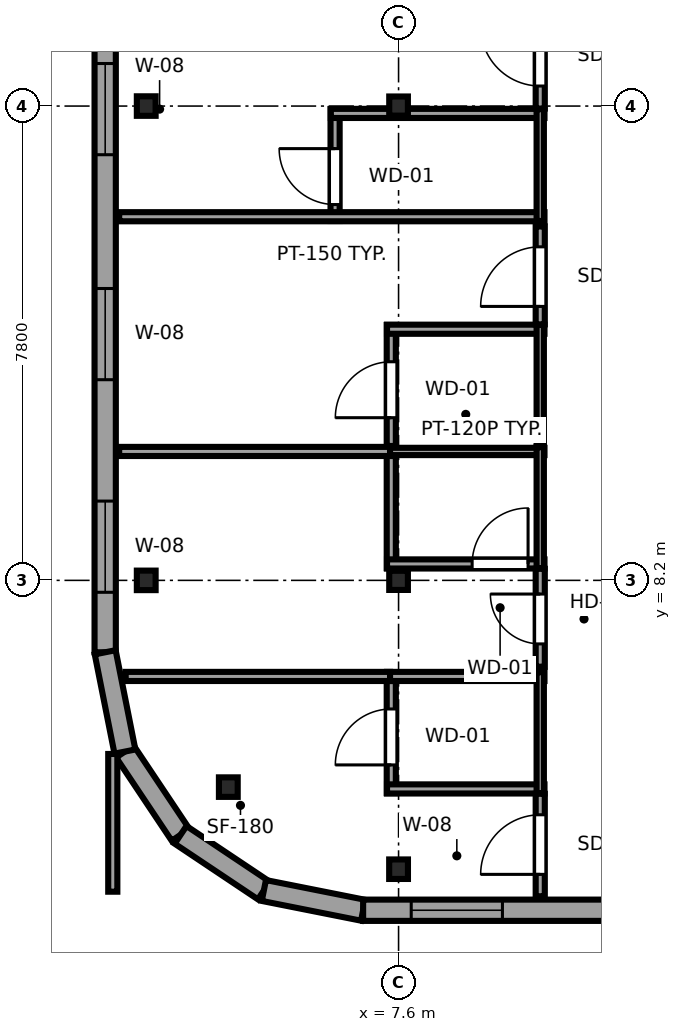
"""IFC4 building model, lengths in metres.
Left out: names, types, materials, properties, quantities, classifications, styles, units other than length and angle.
Written with IfcOpenShell. Run it as: python <this file> out.ifc"""

import sys

from ifc_helpers import new_model, si_unit, direction, frame, frame_2d, origin, origin_2d, place, context, subcontext, project, spatial, rectangle, i_section, extrude, source, transform, mapped, element, fill, save


model = new_model("IFC4")
c1 = context("Model", 3, precision=1e-05, world=origin(), true_north=direction((0.0, 1.0)))
c2 = subcontext(c1, "Body", "Model", "MODEL_VIEW")
j1 = project(units=[si_unit("LENGTHUNIT", "METRE"), si_unit("PLANEANGLEUNIT", "RADIAN")], contexts=[c1])
p1 = place(None, origin())
s1 = spatial("IfcSite", under=j1, at=p1, CompositionType="ELEMENT")
p2 = place(p1, origin())
s2 = spatial("IfcBuilding", under=s1, at=p2, CompositionType="ELEMENT")
p3 = place(p2, frame((0.0, 0.0, 266.5)))
s3 = spatial("IfcBuildingStorey", under=s2, at=p3, CompositionType="ELEMENT", Elevation=266.5)
m1 = source(origin(), c2, "Body", "SweptSolid", [
    extrude(i_section(OverallWidth=0.309, OverallDepth=0.321, WebThickness=0.014, FlangeThickness=0.022, FilletRadius=0.017, at=origin_2d()), origin(), (0.0, 0.0, 1.0), 3.55),
])
for number, where, z_axis, x_axis in (
    (1, (4.8, 4.8, 0.0), (0.0, 0.0, 1.0), (1.0, 0.0, 0.0)),
    (2, (3.45, 8.2, 0.0), (0.0, 0.0, 1.0), (1.0, 0.0, 0.0)),
    (3, (3.45, 16.0, 0.0), (0.0, 0.0, 1.0), (1.0, 0.0, 0.0)),
    (4, (7.6, 3.45, 0.0), (0.0, 0.0, 1.0), (1.0, 0.0, 0.0)),
):
    element("IfcColumn", number, at=place(p3, frame(where, z_axis=z_axis, x_axis=x_axis)), inside=s3, PredefinedType="COLUMN", context=c2, shape_type="MappedRepresentation", body=[
        mapped(m1, transform((0.0, 0.0, 0.0), x_axis=(1.0, 0.0, 0.0), y_axis=(0.0, 1.0, 0.0), z_axis=(0.0, 0.0, 1.0), scale=1.0)),
    ])
m2 = source(origin(), c2, "Body", "SweptSolid", [
    extrude(i_section(OverallWidth=0.307, OverallDepth=0.315, WebThickness=0.012, FlangeThickness=0.019, FilletRadius=0.017, at=origin_2d()), origin(), (0.0, 0.0, 1.0), 3.55),
])
for number, where, z_axis, x_axis in (
    (5, (7.6, 8.2, 0.0), (0.0, 0.0, 1.0), (1.0, 0.0, 0.0)),
    (6, (7.6, 16.0, 0.0), (0.0, 0.0, 1.0), (1.0, 0.0, 0.0)),
):
    element("IfcColumn", number, at=place(p3, frame(where, z_axis=z_axis, x_axis=x_axis)), inside=s3, PredefinedType="COLUMN", context=c2, shape_type="MappedRepresentation", body=[
        mapped(m2, transform((0.0, 0.0, 0.0), x_axis=(1.0, 0.0, 0.0), y_axis=(0.0, 1.0, 0.0), z_axis=(0.0, 0.0, 1.0), scale=1.0)),
    ])
p4 = place(p3, frame((3.1, 5.385, 0.0), z_axis=(0.0, 0.0, 1.0), x_axis=(0.555623290322, -0.831434158098, 0.0)))
e7 = element("IfcWall", 7, at=p4, inside=s3, PredefinedType="SOLIDWALL", context=c2, shape_type="SweptSolid", body=[
    extrude(rectangle(XDim=1.647, YDim=0.35, at=frame_2d((0.824, 0.0))), origin(), (0.0, 0.0, 1.0), 2.04),
])
p5 = place(p3, frame((4.015, 4.015, 0.0), z_axis=(0.0, 0.0, 1.0), x_axis=(0.831434158098, -0.555623290322, 0.0)))
e8 = element("IfcWall", 8, at=p5, inside=s3, PredefinedType="SOLIDWALL", context=c2, shape_type="SweptSolid", body=[
    extrude(rectangle(XDim=1.647, YDim=0.35, at=frame_2d((0.824, 0.0))), origin(), (0.0, 0.0, 1.0), 3.25),
])
p6 = place(p3, frame((5.385, 3.1, 0.0), z_axis=(0.0, 0.0, 1.0), x_axis=(0.980788844421, -0.195072403631, 0.0)))
e9 = element("IfcWall", 9, at=p6, inside=s3, PredefinedType="SOLIDWALL", context=c2, shape_type="SweptSolid", body=[
    extrude(rectangle(XDim=1.665, YDim=0.35, at=frame_2d((0.832, 0.0))), origin(), (0.0, 0.0, 1.0), 3.25),
])
p7 = place(p3, frame((7.017, 2.775, 0.0), z_axis=(0.0, 0.0, 1.0), x_axis=(1.0, 0.0, 0.0)))
e10 = element("IfcWall", 10, at=p7, inside=s3, PredefinedType="SOLIDWALL", context=c2, shape_type="SweptSolid", body=[
    extrude(rectangle(XDim=8.008, YDim=0.35, at=frame_2d((4.004, 0.0))), origin(), (0.0, 0.0, 1.0), 3.25),
])
p8 = place(p7, frame((0.791, 0.0, 0.62)))
e11 = element("IfcOpeningElement", 11, at=p8, cuts=e10, PredefinedType="OPENING", context=c2, shape_type="SweptSolid", body=[
    extrude(rectangle(XDim=1.5, YDim=1.55, at=frame_2d((0.75, 0.775))), frame((0.0, 0.185, 0.0), z_axis=(0.0, -1.0, 0.0), x_axis=(1.0, 0.0, 0.0)), (0.0, 0.0, 1.0), 0.37),
])
p9 = place(p3, frame((2.775, 40.783, 0.0), z_axis=(0.0, 0.0, 1.0), x_axis=(0.0, -1.0, 0.0)))
e12 = element("IfcWall", 12, at=p9, inside=s3, PredefinedType="SOLIDWALL", context=c2, shape_type="SweptSolid", body=[
    extrude(rectangle(XDim=33.766, YDim=0.35, at=frame_2d((16.883, 0.0))), origin(), (0.0, 0.0, 1.0), 3.25),
])
p10 = place(p9, frame((5.678, 0.0, 0.68)))
e13 = element("IfcOpeningElement", 13, at=p10, cuts=e12, PredefinedType="OPENING", context=c2, shape_type="SweptSolid", body=[
    extrude(rectangle(XDim=2.7, YDim=1.95, at=frame_2d((1.35, 0.975))), frame((0.0, 0.185, 0.0), z_axis=(0.0, -1.0, 0.0), x_axis=(1.0, 0.0, 0.0)), (0.0, 0.0, 1.0), 0.37),
])
p11 = place(p9, frame((11.431, 0.0, 0.68)))
e14 = element("IfcOpeningElement", 14, at=p11, cuts=e12, PredefinedType="OPENING", context=c2, shape_type="SweptSolid", body=[
    extrude(rectangle(XDim=2.7, YDim=1.95, at=frame_2d((1.35, 0.975))), frame((0.0, 0.185, 0.0), z_axis=(0.0, -1.0, 0.0), x_axis=(1.0, 0.0, 0.0)), (0.0, 0.0, 1.0), 0.37),
])
p12 = place(p9, frame((15.533, 0.0, 0.68)))
e15 = element("IfcOpeningElement", 15, at=p12, cuts=e12, PredefinedType="OPENING", context=c2, shape_type="SweptSolid", body=[
    extrude(rectangle(XDim=2.7, YDim=1.95, at=frame_2d((1.35, 0.975))), frame((0.0, 0.185, 0.0), z_axis=(0.0, -1.0, 0.0), x_axis=(1.0, 0.0, 0.0)), (0.0, 0.0, 1.0), 0.37),
])
p13 = place(p9, frame((19.635, 0.0, 0.68)))
e16 = element("IfcOpeningElement", 16, at=p13, cuts=e12, PredefinedType="OPENING", context=c2, shape_type="SweptSolid", body=[
    extrude(rectangle(XDim=2.7, YDim=1.95, at=frame_2d((1.35, 0.975))), frame((0.0, 0.185, 0.0), z_axis=(0.0, -1.0, 0.0), x_axis=(1.0, 0.0, 0.0)), (0.0, 0.0, 1.0), 0.37),
])
p14 = place(p9, frame((31.279, 0.0, 0.62)))
e17 = element("IfcOpeningElement", 17, at=p14, cuts=e12, PredefinedType="OPENING", context=c2, shape_type="SweptSolid", body=[
    extrude(rectangle(XDim=1.5, YDim=1.55, at=frame_2d((0.75, 0.775))), frame((0.0, 0.185, 0.0), z_axis=(0.0, -1.0, 0.0), x_axis=(1.0, 0.0, 0.0)), (0.0, 0.0, 1.0), 0.37),
])
p15 = place(p9, frame((27.783, 0.0, 0.62)))
e18 = element("IfcOpeningElement", 18, at=p15, cuts=e12, PredefinedType="OPENING", context=c2, shape_type="SweptSolid", body=[
    extrude(rectangle(XDim=1.5, YDim=1.55, at=frame_2d((0.75, 0.775))), frame((0.0, 0.185, 0.0), z_axis=(0.0, -1.0, 0.0), x_axis=(1.0, 0.0, 0.0)), (0.0, 0.0, 1.0), 0.37),
])
p16 = place(p9, frame((24.083, 0.0, 0.62)))
e19 = element("IfcOpeningElement", 19, at=p16, cuts=e12, PredefinedType="OPENING", context=c2, shape_type="SweptSolid", body=[
    extrude(rectangle(XDim=1.5, YDim=1.55, at=frame_2d((0.75, 0.775))), frame((0.0, 0.185, 0.0), z_axis=(0.0, -1.0, 0.0), x_axis=(1.0, 0.0, 0.0)), (0.0, 0.0, 1.0), 0.37),
])
p17 = place(p9, frame((0.586, 0.0, 0.62)))
e20 = element("IfcOpeningElement", 20, at=p17, cuts=e12, PredefinedType="OPENING", context=c2, shape_type="SweptSolid", body=[
    extrude(rectangle(XDim=1.5, YDim=1.55, at=frame_2d((0.75, 0.775))), frame((0.0, 0.185, 0.0), z_axis=(0.0, -1.0, 0.0), x_axis=(1.0, 0.0, 0.0)), (0.0, 0.0, 1.0), 0.37),
])
p18 = place(p3, frame((2.775, 7.017, 0.0), z_axis=(0.0, 0.0, 1.0), x_axis=(0.195072403631, -0.980788844421, 0.0)))
e21 = element("IfcWall", 21, at=p18, inside=s3, PredefinedType="SOLIDWALL", context=c2, shape_type="SweptSolid", body=[
    extrude(rectangle(XDim=1.665, YDim=0.35, at=frame_2d((0.832, 0.0))), origin(), (0.0, 0.0, 1.0), 2.04),
])
p19 = place(p3, frame((7.48, 4.7, 0.0), z_axis=(0.0, 0.0, 1.0), x_axis=(0.0, 1.0, 0.0)))
e22 = element("IfcWall", 22, at=p19, inside=s3, PredefinedType="PARTITIONING", context=c2, shape_type="SweptSolid", body=[
    extrude(rectangle(XDim=1.99, YDim=0.15, at=frame_2d((0.995, 0.0))), origin(), (0.0, 0.0, 1.0), 2.04),
])
p20 = place(p19, frame((0.465, 0.0, 0.0)))
e23 = element("IfcOpeningElement", 23, at=p20, cuts=e22, PredefinedType="OPENING", context=c2, shape_type="SweptSolid", body=[
    extrude(rectangle(XDim=0.92, YDim=2.01, at=frame_2d((0.46, 1.005))), frame((0.0, 0.085, 0.0), z_axis=(0.0, -1.0, 0.0), x_axis=(1.0, 0.0, 0.0)), (0.0, 0.0, 1.0), 0.17),
])
for number, where, z_axis, x_axis in (
    (24, (7.41, 4.77, 0.0), (0.0, 0.0, 1.0), (1.0, 0.0, 0.0)),
    (25, (7.41, 6.62, 0.0), (0.0, 0.0, 1.0), (1.0, 0.0, 0.0)),
):
    element("IfcWall", number, at=place(p3, frame(where, z_axis=z_axis, x_axis=x_axis)), inside=s3, PredefinedType="PARTITIONING", context=c2, shape_type="SweptSolid", body=[
        extrude(rectangle(XDim=2.59, YDim=0.15, at=frame_2d((1.295, 0.0))), origin(), (0.0, 0.0, 1.0), 3.25),
    ])
p21 = place(p3, frame((9.93, 4.7, 0.0), z_axis=(0.0, 0.0, 1.0), x_axis=(0.0, 1.0, 0.0)))
e26 = element("IfcWall", 26, at=p21, inside=s3, PredefinedType="PLUMBINGWALL", context=c2, shape_type="SweptSolid", body=[
    extrude(rectangle(XDim=1.99, YDim=0.12, at=frame_2d((0.995, 0.0))), origin(), (0.0, 0.0, 1.0), 3.25),
])
p22 = place(p3, frame((7.48, 8.4, 0.0), z_axis=(0.0, 0.0, 1.0), x_axis=(0.0, 1.0, 0.0)))
e27 = element("IfcWall", 27, at=p22, inside=s3, PredefinedType="PARTITIONING", context=c2, shape_type="SweptSolid", body=[
    extrude(rectangle(XDim=1.99, YDim=0.15, at=frame_2d((0.995, 0.0))), origin(), (0.0, 0.0, 1.0), 2.04),
])
p23 = place(p3, frame((7.41, 8.47, 0.0), z_axis=(0.0, 0.0, 1.0), x_axis=(1.0, 0.0, 0.0)))
e28 = element("IfcWall", 28, at=p23, inside=s3, PredefinedType="PARTITIONING", context=c2, shape_type="SweptSolid", body=[
    extrude(rectangle(XDim=2.59, YDim=0.15, at=frame_2d((1.295, 0.0))), origin(), (0.0, 0.0, 1.0), 2.04),
])
p24 = place(p23, frame((1.4, 0.0, 0.0)))
e29 = element("IfcOpeningElement", 29, at=p24, cuts=e28, PredefinedType="OPENING", context=c2, shape_type="SweptSolid", body=[
    extrude(rectangle(XDim=0.92, YDim=2.01, at=frame_2d((0.46, 1.005))), frame((0.0, 0.085, 0.0), z_axis=(0.0, -1.0, 0.0), x_axis=(1.0, 0.0, 0.0)), (0.0, 0.0, 1.0), 0.17),
])
p25 = place(p3, frame((7.41, 10.32, 0.0), z_axis=(0.0, 0.0, 1.0), x_axis=(1.0, 0.0, 0.0)))
e30 = element("IfcWall", 30, at=p25, inside=s3, PredefinedType="PLUMBINGWALL", context=c2, shape_type="SweptSolid", body=[
    extrude(rectangle(XDim=2.59, YDim=0.12, at=frame_2d((1.295, 0.0))), origin(), (0.0, 0.0, 1.0), 3.25),
])
p26 = place(p3, frame((9.93, 8.4, 0.0), z_axis=(0.0, 0.0, 1.0), x_axis=(0.0, 1.0, 0.0)))
e31 = element("IfcWall", 31, at=p26, inside=s3, PredefinedType="PLUMBINGWALL", context=c2, shape_type="SweptSolid", body=[
    extrude(rectangle(XDim=1.99, YDim=0.12, at=frame_2d((0.995, 0.0))), origin(), (0.0, 0.0, 1.0), 3.25),
])
p27 = place(p3, frame((7.48, 10.41, 0.0), z_axis=(0.0, 0.0, 1.0), x_axis=(0.0, 1.0, 0.0)))
e32 = element("IfcWall", 32, at=p27, inside=s3, PredefinedType="PARTITIONING", context=c2, shape_type="SweptSolid", body=[
    extrude(rectangle(XDim=1.99, YDim=0.15, at=frame_2d((0.995, 0.0))), origin(), (0.0, 0.0, 1.0), 2.04),
])
p28 = place(p27, frame((0.465, 0.0, 0.0)))
e33 = element("IfcOpeningElement", 33, at=p28, cuts=e32, PredefinedType="OPENING", context=c2, shape_type="SweptSolid", body=[
    extrude(rectangle(XDim=0.92, YDim=2.01, at=frame_2d((0.46, 1.005))), frame((0.0, 0.085, 0.0), z_axis=(0.0, -1.0, 0.0), x_axis=(1.0, 0.0, 0.0)), (0.0, 0.0, 1.0), 0.17),
])
p29 = place(p3, frame((7.41, 12.33, 0.0), z_axis=(0.0, 0.0, 1.0), x_axis=(1.0, 0.0, 0.0)))
e34 = element("IfcWall", 34, at=p29, inside=s3, PredefinedType="PARTITIONING", context=c2, shape_type="SweptSolid", body=[
    extrude(rectangle(XDim=2.59, YDim=0.15, at=frame_2d((1.295, 0.0))), origin(), (0.0, 0.0, 1.0), 3.25),
])
p30 = place(p3, frame((9.93, 10.41, 0.0), z_axis=(0.0, 0.0, 1.0), x_axis=(0.0, 1.0, 0.0)))
e35 = element("IfcWall", 35, at=p30, inside=s3, PredefinedType="PLUMBINGWALL", context=c2, shape_type="SweptSolid", body=[
    extrude(rectangle(XDim=1.99, YDim=0.12, at=frame_2d((0.995, 0.0))), origin(), (0.0, 0.0, 1.0), 3.25),
])
p31 = place(p3, frame((6.556, 14.11, 0.0), z_axis=(0.0, 0.0, 1.0), x_axis=(0.0, 1.0, 0.0)))
e36 = element("IfcWall", 36, at=p31, inside=s3, PredefinedType="PARTITIONING", context=c2, shape_type="SweptSolid", body=[
    extrude(rectangle(XDim=1.839, YDim=0.15, at=frame_2d((0.919, 0.0))), origin(), (0.0, 0.0, 1.0), 3.25),
])
p32 = place(p31, frame((0.27, 0.0, 0.0)))
e37 = element("IfcOpeningElement", 37, at=p32, cuts=e36, PredefinedType="OPENING", context=c2, shape_type="SweptSolid", body=[
    extrude(rectangle(XDim=0.92, YDim=2.01, at=frame_2d((0.46, 1.005))), frame((0.0, 0.085, 0.0), z_axis=(0.0, -1.0, 0.0), x_axis=(1.0, 0.0, 0.0)), (0.0, 0.0, 1.0), 0.17),
])
p33 = place(p3, frame((3.005, 14.18, 0.0), z_axis=(0.0, 0.0, 1.0), x_axis=(1.0, 0.0, 0.0)))
e38 = element("IfcWall", 38, at=p33, inside=s3, PredefinedType="PARTITIONING", context=c2, shape_type="SweptSolid", body=[
    extrude(rectangle(XDim=6.995, YDim=0.15, at=frame_2d((3.498, 0.0))), origin(), (0.0, 0.0, 1.0), 3.25),
])
p34 = place(p3, frame((6.486, 15.879, 0.0), z_axis=(0.0, 0.0, 1.0), x_axis=(1.0, 0.0, 0.0)))
e39 = element("IfcWall", 39, at=p34, inside=s3, PredefinedType="PARTITIONING", context=c2, shape_type="SweptSolid", body=[
    extrude(rectangle(XDim=3.514, YDim=0.15, at=frame_2d((1.757, 0.0))), origin(), (0.0, 0.0, 1.0), 2.04),
])
p35 = place(p3, frame((9.93, 14.11, 0.0), z_axis=(0.0, 0.0, 1.0), x_axis=(0.0, 1.0, 0.0)))
e40 = element("IfcWall", 40, at=p35, inside=s3, PredefinedType="PLUMBINGWALL", context=c2, shape_type="SweptSolid", body=[
    extrude(rectangle(XDim=1.839, YDim=0.12, at=frame_2d((0.919, 0.0))), origin(), (0.0, 0.0, 1.0), 3.25),
])
p36 = place(p3, frame((9.93, 3.005, 0.0), z_axis=(0.0, 0.0, 1.0), x_axis=(0.0, 1.0, 0.0)))
e41 = element("IfcWall", 41, at=p36, inside=s3, PredefinedType="PARTITIONING", context=c2, shape_type="SweptSolid", body=[
    extrude(rectangle(XDim=1.685, YDim=0.15, at=frame_2d((0.843, 0.0))), origin(), (0.0, 0.0, 1.0), 3.25),
])
p37 = place(p36, frame((0.36, 0.0, 0.0)))
e42 = element("IfcOpeningElement", 42, at=p37, cuts=e41, PredefinedType="OPENING", context=c2, shape_type="SweptSolid", body=[
    extrude(rectangle(XDim=0.98, YDim=2.12, at=frame_2d((0.49, 1.06))), frame((0.0, 0.085, 0.0), z_axis=(0.0, -1.0, 0.0), x_axis=(1.0, 0.0, 0.0)), (0.0, 0.0, 1.0), 0.17),
])
p38 = place(p3, frame((3.112, 6.62, 0.0), z_axis=(0.0, 0.0, 1.0), x_axis=(1.0, 0.0, 0.0)))
e43 = element("IfcWall", 43, at=p38, inside=s3, PredefinedType="PARTITIONING", context=c2, shape_type="SweptSolid", body=[
    extrude(rectangle(XDim=4.348, YDim=0.15, at=frame_2d((2.174, 0.0))), origin(), (0.0, 0.0, 1.0), 3.25),
])
p39 = place(p3, frame((2.9, 3.08, 0.0), z_axis=(0.0, 0.0, 1.0), x_axis=(0.0, 1.0, 0.0)))
e44 = element("IfcWall", 44, at=p39, inside=s3, PredefinedType="PARTITIONING", context=c2, shape_type="SweptSolid", body=[
    extrude(rectangle(XDim=2.265, YDim=0.15, at=frame_2d((1.132, 0.0))), origin(), (0.0, 0.0, 1.0), 3.25),
])
p40 = place(p3, frame((9.93, 6.78, 0.0), z_axis=(0.0, 0.0, 1.0), x_axis=(0.0, 1.0, 0.0)))
e45 = element("IfcWall", 45, at=p40, inside=s3, PredefinedType="PARTITIONING", context=c2, shape_type="SweptSolid", body=[
    extrude(rectangle(XDim=1.61, YDim=0.15, at=frame_2d((0.805, 0.0))), origin(), (0.0, 0.0, 1.0), 3.25),
])
p41 = place(p40, frame((0.375, 0.0, 0.0)))
e46 = element("IfcOpeningElement", 46, at=p41, cuts=e45, PredefinedType="OPENING", context=c2, shape_type="SweptSolid", body=[
    extrude(rectangle(XDim=0.82, YDim=2.01, at=frame_2d((0.41, 1.005))), frame((0.0, 0.085, 0.0), z_axis=(0.0, -1.0, 0.0), x_axis=(1.0, 0.0, 0.0)), (0.0, 0.0, 1.0), 0.17),
])
p42 = place(p3, frame((3.005, 10.32, 0.0), z_axis=(0.0, 0.0, 1.0), x_axis=(1.0, 0.0, 0.0)))
e47 = element("IfcWall", 47, at=p42, inside=s3, PredefinedType="PARTITIONING", context=c2, shape_type="SweptSolid", body=[
    extrude(rectangle(XDim=4.455, YDim=0.15, at=frame_2d((2.228, 0.0))), origin(), (0.0, 0.0, 1.0), 3.25),
])
p43 = place(p3, frame((9.93, 12.41, 0.0), z_axis=(0.0, 0.0, 1.0), x_axis=(0.0, 1.0, 0.0)))
e48 = element("IfcWall", 48, at=p43, inside=s3, PredefinedType="PARTITIONING", context=c2, shape_type="SweptSolid", body=[
    extrude(rectangle(XDim=1.61, YDim=0.15, at=frame_2d((0.805, 0.0))), origin(), (0.0, 0.0, 1.0), 3.25),
])
p44 = place(p43, frame((0.295, 0.0, 0.0)))
e49 = element("IfcOpeningElement", 49, at=p44, cuts=e48, PredefinedType="OPENING", context=c2, shape_type="SweptSolid", body=[
    extrude(rectangle(XDim=0.98, YDim=2.12, at=frame_2d((0.49, 1.06))), frame((0.0, 0.085, 0.0), z_axis=(0.0, -1.0, 0.0), x_axis=(1.0, 0.0, 0.0)), (0.0, 0.0, 1.0), 0.17),
])
p45 = place(p3, frame((9.93, 15.959, 0.0), z_axis=(0.0, 0.0, 1.0), x_axis=(0.0, 1.0, 0.0)))
e50 = element("IfcWall", 50, at=p45, inside=s3, PredefinedType="PARTITIONING", context=c2, shape_type="SweptSolid", body=[
    extrude(rectangle(XDim=1.761, YDim=0.15, at=frame_2d((0.88, 0.0))), origin(), (0.0, 0.0, 1.0), 3.25),
])
p46 = place(p45, frame((0.371, 0.0, 0.0)))
e51 = element("IfcOpeningElement", 51, at=p46, cuts=e50, PredefinedType="OPENING", context=c2, shape_type="SweptSolid", body=[
    extrude(rectangle(XDim=0.98, YDim=2.12, at=frame_2d((0.49, 1.06))), frame((0.0, 0.085, 0.0), z_axis=(0.0, -1.0, 0.0), x_axis=(1.0, 0.0, 0.0)), (0.0, 0.0, 1.0), 0.17),
])
m3 = source(origin(), c2, "Body", "SweptSolid", [
    extrude(rectangle(XDim=1.5, YDim=1.55, at=frame_2d((0.75, 0.775))), frame((0.0, 0.09, 0.0), z_axis=(0.0, -1.0, 0.0), x_axis=(1.0, 0.0, 0.0)), (0.0, 0.0, 1.0), 0.06),
])
p47 = place(p8, origin())
e52 = element("IfcWindow", 52, at=p47, inside=s3, PartitioningType="SINGLE_PANEL", PredefinedType="WINDOW", context=c2, shape_type="MappedRepresentation", body=[
    mapped(m3, transform((0.0, 0.0, 0.0), x_axis=(1.0, 0.0, 0.0), y_axis=(0.0, 1.0, 0.0), z_axis=(0.0, 0.0, 1.0), scale=1.0)),
])
fill(e11, e52)
p48 = place(p14, origin())
e53 = element("IfcWindow", 53, at=p48, inside=s3, PartitioningType="SINGLE_PANEL", PredefinedType="WINDOW", context=c2, shape_type="MappedRepresentation", body=[
    mapped(m3, transform((0.0, 0.0, 0.0), x_axis=(1.0, 0.0, 0.0), y_axis=(0.0, 1.0, 0.0), z_axis=(0.0, 0.0, 1.0), scale=1.0)),
])
fill(e17, e53)
p49 = place(p15, origin())
e54 = element("IfcWindow", 54, at=p49, inside=s3, PartitioningType="SINGLE_PANEL", PredefinedType="WINDOW", context=c2, shape_type="MappedRepresentation", body=[
    mapped(m3, transform((0.0, 0.0, 0.0), x_axis=(1.0, 0.0, 0.0), y_axis=(0.0, 1.0, 0.0), z_axis=(0.0, 0.0, 1.0), scale=1.0)),
])
fill(e18, e54)
p50 = place(p16, origin())
e55 = element("IfcWindow", 55, at=p50, inside=s3, PartitioningType="SINGLE_PANEL", PredefinedType="WINDOW", context=c2, shape_type="MappedRepresentation", body=[
    mapped(m3, transform((0.0, 0.0, 0.0), x_axis=(1.0, 0.0, 0.0), y_axis=(0.0, 1.0, 0.0), z_axis=(0.0, 0.0, 1.0), scale=1.0)),
])
fill(e19, e55)
m4 = source(origin(), c2, "Body", "SweptSolid", [
    extrude(rectangle(XDim=0.92, YDim=2.01, at=frame_2d((0.46, 1.005))), frame((0.0, 0.025, 0.0), z_axis=(0.0, -1.0, 0.0), x_axis=(1.0, 0.0, 0.0)), (0.0, 0.0, 1.0), 0.05),
])
p51 = place(p20, origin())
e56 = element("IfcDoor", 56, at=p51, inside=s3, OperationType="SINGLE_SWING_LEFT", PredefinedType="DOOR", context=c2, shape_type="MappedRepresentation", body=[
    mapped(m4, transform((0.0, 0.0, 0.0), x_axis=(1.0, 0.0, 0.0), y_axis=(0.0, 1.0, 0.0), z_axis=(0.0, 0.0, 1.0), scale=1.0)),
])
fill(e23, e56)
p52 = place(p24, origin())
e57 = element("IfcDoor", 57, at=p52, inside=s3, OperationType="SINGLE_SWING_RIGHT", PredefinedType="DOOR", context=c2, shape_type="MappedRepresentation", body=[
    mapped(m4, transform((0.0, 0.0, 0.0), x_axis=(1.0, 0.0, 0.0), y_axis=(0.0, 1.0, 0.0), z_axis=(0.0, 0.0, 1.0), scale=1.0)),
])
fill(e29, e57)
p53 = place(p28, origin())
e58 = element("IfcDoor", 58, at=p53, inside=s3, OperationType="SINGLE_SWING_LEFT", PredefinedType="DOOR", context=c2, shape_type="MappedRepresentation", body=[
    mapped(m4, transform((0.0, 0.0, 0.0), x_axis=(1.0, 0.0, 0.0), y_axis=(0.0, 1.0, 0.0), z_axis=(0.0, 0.0, 1.0), scale=1.0)),
])
fill(e33, e58)
p54 = place(p32, origin())
e59 = element("IfcDoor", 59, at=p54, inside=s3, OperationType="SINGLE_SWING_RIGHT", PredefinedType="DOOR", context=c2, shape_type="MappedRepresentation", body=[
    mapped(m4, transform((0.0, 0.0, 0.0), x_axis=(1.0, 0.0, 0.0), y_axis=(0.0, 1.0, 0.0), z_axis=(0.0, 0.0, 1.0), scale=1.0)),
])
fill(e37, e59)
m5 = source(origin(), c2, "Body", "SweptSolid", [
    extrude(rectangle(XDim=0.98, YDim=2.12, at=frame_2d((0.49, 1.06))), frame((0.0, 0.025, 0.0), z_axis=(0.0, -1.0, 0.0), x_axis=(1.0, 0.0, 0.0)), (0.0, 0.0, 1.0), 0.05),
])
p55 = place(p37, origin())
e60 = element("IfcDoor", 60, at=p55, inside=s3, OperationType="SINGLE_SWING_LEFT", PredefinedType="DOOR", context=c2, shape_type="MappedRepresentation", body=[
    mapped(m5, transform((0.0, 0.0, 0.0), x_axis=(1.0, 0.0, 0.0), y_axis=(0.0, 1.0, 0.0), z_axis=(0.0, 0.0, 1.0), scale=1.0)),
])
fill(e42, e60)
m6 = source(origin(), c2, "Body", "SweptSolid", [
    extrude(rectangle(XDim=0.82, YDim=2.01, at=frame_2d((0.41, 1.005))), frame((0.0, 0.025, 0.0), z_axis=(0.0, -1.0, 0.0), x_axis=(1.0, 0.0, 0.0)), (0.0, 0.0, 1.0), 0.05),
])
p56 = place(p41, origin())
e61 = element("IfcDoor", 61, at=p56, inside=s3, OperationType="SINGLE_SWING_RIGHT", PredefinedType="DOOR", context=c2, shape_type="MappedRepresentation", body=[
    mapped(m6, transform((0.0, 0.0, 0.0), x_axis=(1.0, 0.0, 0.0), y_axis=(0.0, 1.0, 0.0), z_axis=(0.0, 0.0, 1.0), scale=1.0)),
])
fill(e46, e61)
p57 = place(p44, origin())
e62 = element("IfcDoor", 62, at=p57, inside=s3, OperationType="SINGLE_SWING_LEFT", PredefinedType="DOOR", context=c2, shape_type="MappedRepresentation", body=[
    mapped(m5, transform((0.0, 0.0, 0.0), x_axis=(1.0, 0.0, 0.0), y_axis=(0.0, 1.0, 0.0), z_axis=(0.0, 0.0, 1.0), scale=1.0)),
])
fill(e49, e62)
p58 = place(p46, origin())
e63 = element("IfcDoor", 63, at=p58, inside=s3, OperationType="SINGLE_SWING_RIGHT", PredefinedType="DOOR", context=c2, shape_type="MappedRepresentation", body=[
    mapped(m5, transform((0.0, 0.0, 0.0), x_axis=(1.0, 0.0, 0.0), y_axis=(0.0, 1.0, 0.0), z_axis=(0.0, 0.0, 1.0), scale=1.0)),
])
fill(e51, e63)
save(model, sys.argv[1])
